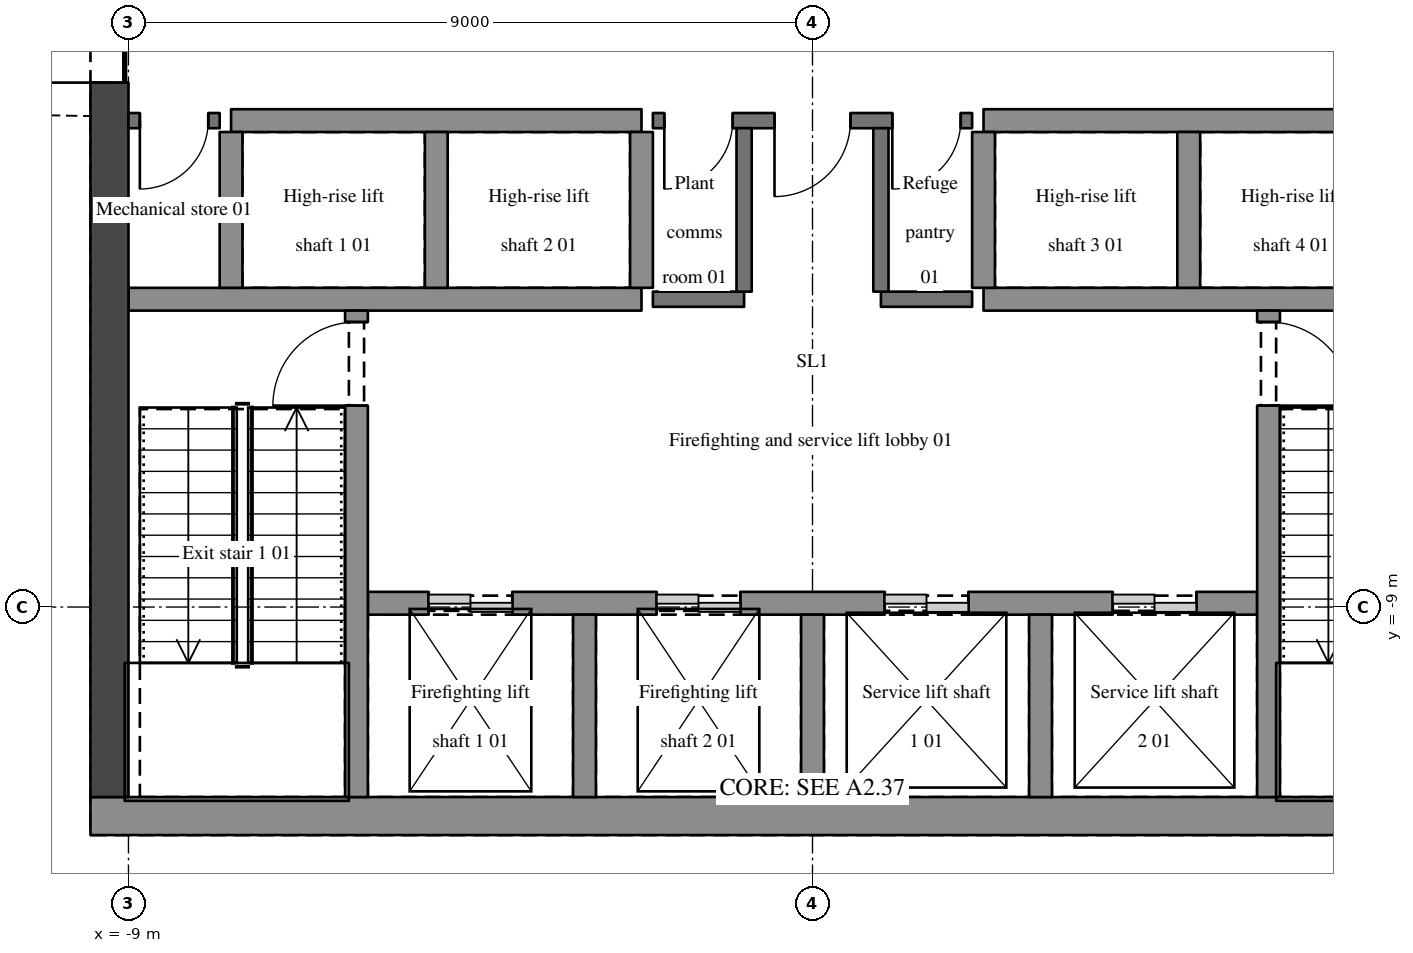
"""IFC4 building model, lengths in metres.
Left out: names, types, materials, properties, quantities, classifications, styles, units other than length and angle.
Written with IfcOpenShell. Run it as: python <this file> out.ifc"""

import sys

from ifc_helpers import new_model, si_unit, direction, frame, frame_2d, origin, place, context, subcontext, project, spatial, rectangle, extrude, element, fill, save


model = new_model("IFC4")
c1 = context("Model", 3, precision=1e-05, world=origin(), true_north=direction((0.0, 1.0)))
c2 = subcontext(c1, "Body", "Model", "MODEL_VIEW")
j1 = project(units=[si_unit("LENGTHUNIT", "METRE"), si_unit("PLANEANGLEUNIT", "RADIAN")], contexts=[c1])
p1 = place(None, origin())
s1 = spatial("IfcSite", under=j1, at=p1, CompositionType="ELEMENT")
p2 = place(p1, origin())
s2 = spatial("IfcBuilding", under=s1, at=p2, CompositionType="ELEMENT")
p3 = place(p2, frame((0.0, 0.0, 255.0)))
s3 = spatial("IfcBuildingStorey", under=s2, at=p3, CompositionType="ELEMENT", Elevation=255.0)
p4 = place(p3, frame((-9.5, -11.75, 0.0), z_axis=(0.0, 0.0, 1.0), x_axis=(1.0, 0.0, 0.0)))
e1 = element("IfcWall", 1, at=p4, inside=s3, PredefinedType="SHEAR", context=c2, shape_type="SweptSolid", body=[
    extrude(rectangle(XDim=19.0, YDim=0.5, at=frame_2d((9.5, 0.0))), origin(), (0.0, 0.0, 1.0), 4.5),
])
p5 = place(p3, frame((-9.25, -11.5, 0.0), z_axis=(0.0, 0.0, 1.0), x_axis=(0.0, 1.0, 0.0)))
e2 = element("IfcWall", 2, at=p5, inside=s3, PredefinedType="SHEAR", context=c2, shape_type="SweptSolid", body=[
    extrude(rectangle(XDim=11.65, YDim=0.5, at=frame_2d((5.825, 0.0))), origin(), (0.0, 0.0, 1.0), 4.5),
])
p6 = place(p5, frame((9.4, 0.0, 0.0)))
e3 = element("IfcOpeningElement", 3, at=p6, cuts=e2, PredefinedType="OPENING", context=c2, shape_type="SweptSolid", body=[
    extrude(rectangle(XDim=1.8, YDim=2.1, at=frame_2d((0.9, 1.05))), frame((0.0, 0.26, 0.0), z_axis=(0.0, -1.0, 0.0), x_axis=(1.0, 0.0, 0.0)), (0.0, 0.0, 1.0), 0.52),
])
p7 = place(p3, frame((-5.85, -8.95, 0.0), z_axis=(0.0, 0.0, 1.0), x_axis=(1.0, 0.0, 0.0)))
e4 = element("IfcWall", 4, at=p7, inside=s3, PredefinedType="SHEAR", context=c2, shape_type="SweptSolid", body=[
    extrude(rectangle(XDim=11.7, YDim=0.3, at=frame_2d((5.85, 0.0))), origin(), (0.0, 0.0, 1.0), 4.5),
])
p8 = place(p7, frame((0.8, 0.0, 0.0)))
e5 = element("IfcOpeningElement", 5, at=p8, cuts=e4, PredefinedType="OPENING", context=c2, shape_type="SweptSolid", body=[
    extrude(rectangle(XDim=1.1, YDim=2.1, at=frame_2d((0.55, 1.05))), frame((0.0, 0.16, 0.0), z_axis=(0.0, -1.0, 0.0), x_axis=(1.0, 0.0, 0.0)), (0.0, 0.0, 1.0), 0.32),
])
p9 = place(p7, frame((3.8, 0.0, 0.0)))
e6 = element("IfcOpeningElement", 6, at=p9, cuts=e4, PredefinedType="OPENING", context=c2, shape_type="SweptSolid", body=[
    extrude(rectangle(XDim=1.1, YDim=2.1, at=frame_2d((0.55, 1.05))), frame((0.0, 0.16, 0.0), z_axis=(0.0, -1.0, 0.0), x_axis=(1.0, 0.0, 0.0)), (0.0, 0.0, 1.0), 0.32),
])
p10 = place(p7, frame((6.8, 0.0, 0.0)))
e7 = element("IfcOpeningElement", 7, at=p10, cuts=e4, PredefinedType="OPENING", context=c2, shape_type="SweptSolid", body=[
    extrude(rectangle(XDim=1.1, YDim=2.1, at=frame_2d((0.55, 1.05))), frame((0.0, 0.16, 0.0), z_axis=(0.0, -1.0, 0.0), x_axis=(1.0, 0.0, 0.0)), (0.0, 0.0, 1.0), 0.32),
])
p11 = place(p7, frame((9.8, 0.0, 0.0)))
e8 = element("IfcOpeningElement", 8, at=p11, cuts=e4, PredefinedType="OPENING", context=c2, shape_type="SweptSolid", body=[
    extrude(rectangle(XDim=1.1, YDim=2.1, at=frame_2d((0.55, 1.05))), frame((0.0, 0.16, 0.0), z_axis=(0.0, -1.0, 0.0), x_axis=(1.0, 0.0, 0.0)), (0.0, 0.0, 1.0), 0.32),
])
p12 = place(p3, frame((-9.0, -4.95, 0.0), z_axis=(0.0, 0.0, 1.0), x_axis=(1.0, 0.0, 0.0)))
e9 = element("IfcWall", 9, at=p12, inside=s3, PredefinedType="SHEAR", context=c2, shape_type="SweptSolid", body=[
    extrude(rectangle(XDim=6.75, YDim=0.3, at=frame_2d((3.375, 0.0))), origin(), (0.0, 0.0, 1.0), 4.5),
])
for number, where, z_axis, x_axis in (
    (10, (-2.1, -4.95, 0.0), (0.0, 0.0, 1.0), (1.0, 0.0, 0.0)),
    (11, (0.9, -4.95, 0.0), (0.0, 0.0, 1.0), (1.0, 0.0, 0.0)),
):
    element("IfcWall", number, at=place(p3, frame(where, z_axis=z_axis, x_axis=x_axis)), inside=s3, PredefinedType="SOLIDWALL", context=c2, shape_type="SweptSolid", body=[
        extrude(rectangle(XDim=1.2, YDim=0.2, at=frame_2d((0.6, 0.0))), origin(), (0.0, 0.0, 1.0), 4.2),
    ])
p13 = place(p3, frame((2.25, -4.95, 0.0), z_axis=(0.0, 0.0, 1.0), x_axis=(1.0, 0.0, 0.0)))
e12 = element("IfcWall", 12, at=p13, inside=s3, PredefinedType="SHEAR", context=c2, shape_type="SweptSolid", body=[
    extrude(rectangle(XDim=6.75, YDim=0.3, at=frame_2d((3.375, 0.0))), origin(), (0.0, 0.0, 1.0), 4.5),
])
p14 = place(p3, frame((-7.8, -2.6, 0.0), z_axis=(0.0, 0.0, 1.0), x_axis=(-1.0, 0.0, 0.0)))
e13 = element("IfcWall", 13, at=p14, inside=s3, PredefinedType="SOLIDWALL", context=c2, shape_type="SweptSolid", body=[
    extrude(rectangle(XDim=1.2, YDim=0.2, at=frame_2d((0.6, 0.0))), origin(), (0.0, 0.0, 1.0), 4.2),
])
p15 = place(p14, frame((0.15, 0.0, 0.0)))
e14 = element("IfcOpeningElement", 14, at=p15, cuts=e13, PredefinedType="OPENING", context=c2, shape_type="SweptSolid", body=[
    extrude(rectangle(XDim=0.9, YDim=2.1, at=frame_2d((0.45, 1.05))), frame((0.0, 0.11, 0.0), z_axis=(0.0, -1.0, 0.0), x_axis=(1.0, 0.0, 0.0)), (0.0, 0.0, 1.0), 0.22),
])
p16 = place(p3, frame((-7.65, -2.6, 0.0), z_axis=(0.0, 0.0, 1.0), x_axis=(1.0, 0.0, 0.0)))
e15 = element("IfcWall", 15, at=p16, inside=s3, PredefinedType="SHEAR", context=c2, shape_type="SweptSolid", body=[
    extrude(rectangle(XDim=5.4, YDim=0.3, at=frame_2d((2.7, 0.0))), origin(), (0.0, 0.0, 1.0), 4.5),
])
p17 = place(p3, frame((2.1, -2.6, 0.0), z_axis=(0.0, 0.0, 1.0), x_axis=(-1.0, 0.0, 0.0)))
e16 = element("IfcWall", 16, at=p17, inside=s3, PredefinedType="SOLIDWALL", context=c2, shape_type="SweptSolid", body=[
    extrude(rectangle(XDim=4.2, YDim=0.2, at=frame_2d((2.1, 0.0))), origin(), (0.0, 0.0, 1.0), 4.2),
])
p18 = place(p17, frame((1.6, 0.0, 0.0)))
e17 = element("IfcOpeningElement", 17, at=p18, cuts=e16, PredefinedType="OPENING", context=c2, shape_type="SweptSolid", body=[
    extrude(rectangle(XDim=1.0, YDim=2.1, at=frame_2d((0.5, 1.05))), frame((0.0, 0.11, 0.0), z_axis=(0.0, -1.0, 0.0), x_axis=(1.0, 0.0, 0.0)), (0.0, 0.0, 1.0), 0.22),
])
p19 = place(p17, frame((3.15, 0.0, 0.0)))
e18 = element("IfcOpeningElement", 18, at=p19, cuts=e16, PredefinedType="OPENING", context=c2, shape_type="SweptSolid", body=[
    extrude(rectangle(XDim=0.9, YDim=2.1, at=frame_2d((0.45, 1.05))), frame((0.0, 0.11, 0.0), z_axis=(0.0, -1.0, 0.0), x_axis=(1.0, 0.0, 0.0)), (0.0, 0.0, 1.0), 0.22),
])
p20 = place(p17, frame((0.15, 0.0, 0.0)))
e19 = element("IfcOpeningElement", 19, at=p20, cuts=e16, PredefinedType="OPENING", context=c2, shape_type="SweptSolid", body=[
    extrude(rectangle(XDim=0.9, YDim=2.1, at=frame_2d((0.45, 1.05))), frame((0.0, 0.11, 0.0), z_axis=(0.0, -1.0, 0.0), x_axis=(1.0, 0.0, 0.0)), (0.0, 0.0, 1.0), 0.22),
])
p21 = place(p3, frame((2.25, -2.6, 0.0), z_axis=(0.0, 0.0, 1.0), x_axis=(1.0, 0.0, 0.0)))
e20 = element("IfcWall", 20, at=p21, inside=s3, PredefinedType="SHEAR", context=c2, shape_type="SweptSolid", body=[
    extrude(rectangle(XDim=5.4, YDim=0.3, at=frame_2d((2.7, 0.0))), origin(), (0.0, 0.0, 1.0), 4.5),
])
p22 = place(p3, frame((-7.65, -4.8, 0.0), z_axis=(0.0, 0.0, 1.0), x_axis=(0.0, 1.0, 0.0)))
e21 = element("IfcWall", 21, at=p22, inside=s3, PredefinedType="SHEAR", context=c2, shape_type="SweptSolid", body=[
    extrude(rectangle(XDim=2.05, YDim=0.3, at=frame_2d((1.025, 0.0))), origin(), (0.0, 0.0, 1.0), 4.5),
])
p23 = place(p3, frame((-6.0, -11.5, 0.0), z_axis=(0.0, 0.0, 1.0), x_axis=(0.0, 1.0, 0.0)))
e22 = element("IfcWall", 22, at=p23, inside=s3, PredefinedType="SHEAR", context=c2, shape_type="SweptSolid", body=[
    extrude(rectangle(XDim=6.4, YDim=0.3, at=frame_2d((3.2, 0.0))), origin(), (0.0, 0.0, 1.0), 4.5),
])
p24 = place(p23, frame((5.15, 0.0, 0.0)))
e23 = element("IfcOpeningElement", 23, at=p24, cuts=e22, PredefinedType="OPENING", context=c2, shape_type="SweptSolid", body=[
    extrude(rectangle(XDim=1.1, YDim=2.1, at=frame_2d((0.55, 1.05))), frame((0.0, 0.16, 0.0), z_axis=(0.0, -1.0, 0.0), x_axis=(1.0, 0.0, 0.0)), (0.0, 0.0, 1.0), 0.32),
])
p25 = place(p3, frame((-4.95, -4.8, 0.0), z_axis=(0.0, 0.0, 1.0), x_axis=(0.0, 1.0, 0.0)))
e24 = element("IfcWall", 24, at=p25, inside=s3, PredefinedType="SHEAR", context=c2, shape_type="SweptSolid", body=[
    extrude(rectangle(XDim=2.05, YDim=0.3, at=frame_2d((1.025, 0.0))), origin(), (0.0, 0.0, 1.0), 4.5),
])
p26 = place(p3, frame((-3.0, -11.5, 0.0), z_axis=(0.0, 0.0, 1.0), x_axis=(0.0, 1.0, 0.0)))
e25 = element("IfcWall", 25, at=p26, inside=s3, PredefinedType="SHEAR", context=c2, shape_type="SweptSolid", body=[
    extrude(rectangle(XDim=2.4, YDim=0.3, at=frame_2d((1.2, 0.0))), origin(), (0.0, 0.0, 1.0), 4.5),
])
p27 = place(p3, frame((-2.25, -4.8, 0.0), z_axis=(0.0, 0.0, 1.0), x_axis=(0.0, 1.0, 0.0)))
e26 = element("IfcWall", 26, at=p27, inside=s3, PredefinedType="SHEAR", context=c2, shape_type="SweptSolid", body=[
    extrude(rectangle(XDim=2.05, YDim=0.3, at=frame_2d((1.025, 0.0))), origin(), (0.0, 0.0, 1.0), 4.5),
])
p28 = place(p3, frame((-0.9, -4.85, 0.0), z_axis=(0.0, 0.0, 1.0), x_axis=(0.0, 1.0, 0.0)))
e27 = element("IfcWall", 27, at=p28, inside=s3, PredefinedType="SOLIDWALL", context=c2, shape_type="SweptSolid", body=[
    extrude(rectangle(XDim=2.15, YDim=0.2, at=frame_2d((1.075, 0.0))), origin(), (0.0, 0.0, 1.0), 4.2),
])
p29 = place(p3, frame((0.0, -11.5, 0.0), z_axis=(0.0, 0.0, 1.0), x_axis=(0.0, 1.0, 0.0)))
e28 = element("IfcWall", 28, at=p29, inside=s3, PredefinedType="SHEAR", context=c2, shape_type="SweptSolid", body=[
    extrude(rectangle(XDim=2.4, YDim=0.3, at=frame_2d((1.2, 0.0))), origin(), (0.0, 0.0, 1.0), 4.5),
])
p30 = place(p3, frame((0.9, -4.85, 0.0), z_axis=(0.0, 0.0, 1.0), x_axis=(0.0, 1.0, 0.0)))
e29 = element("IfcWall", 29, at=p30, inside=s3, PredefinedType="SOLIDWALL", context=c2, shape_type="SweptSolid", body=[
    extrude(rectangle(XDim=2.15, YDim=0.2, at=frame_2d((1.075, 0.0))), origin(), (0.0, 0.0, 1.0), 4.2),
])
p31 = place(p3, frame((2.25, -4.8, 0.0), z_axis=(0.0, 0.0, 1.0), x_axis=(0.0, 1.0, 0.0)))
e30 = element("IfcWall", 30, at=p31, inside=s3, PredefinedType="SHEAR", context=c2, shape_type="SweptSolid", body=[
    extrude(rectangle(XDim=2.05, YDim=0.3, at=frame_2d((1.025, 0.0))), origin(), (0.0, 0.0, 1.0), 4.5),
])
p32 = place(p3, frame((3.0, -11.5, 0.0), z_axis=(0.0, 0.0, 1.0), x_axis=(0.0, 1.0, 0.0)))
e31 = element("IfcWall", 31, at=p32, inside=s3, PredefinedType="SHEAR", context=c2, shape_type="SweptSolid", body=[
    extrude(rectangle(XDim=2.4, YDim=0.3, at=frame_2d((1.2, 0.0))), origin(), (0.0, 0.0, 1.0), 4.5),
])
p33 = place(p3, frame((4.95, -4.8, 0.0), z_axis=(0.0, 0.0, 1.0), x_axis=(0.0, 1.0, 0.0)))
e32 = element("IfcWall", 32, at=p33, inside=s3, PredefinedType="SHEAR", context=c2, shape_type="SweptSolid", body=[
    extrude(rectangle(XDim=2.05, YDim=0.3, at=frame_2d((1.025, 0.0))), origin(), (0.0, 0.0, 1.0), 4.5),
])
p34 = place(p3, frame((6.0, -5.1, 0.0), z_axis=(0.0, 0.0, 1.0), x_axis=(0.0, -1.0, 0.0)))
e33 = element("IfcWall", 33, at=p34, inside=s3, PredefinedType="SHEAR", context=c2, shape_type="SweptSolid", body=[
    extrude(rectangle(XDim=6.4, YDim=0.3, at=frame_2d((3.2, 0.0))), origin(), (0.0, 0.0, 1.0), 4.5),
])
p35 = place(p34, frame((0.15, 0.0, 0.0)))
e34 = element("IfcOpeningElement", 34, at=p35, cuts=e33, PredefinedType="OPENING", context=c2, shape_type="SweptSolid", body=[
    extrude(rectangle(XDim=1.1, YDim=2.1, at=frame_2d((0.55, 1.05))), frame((0.0, 0.16, 0.0), z_axis=(0.0, -1.0, 0.0), x_axis=(1.0, 0.0, 0.0)), (0.0, 0.0, 1.0), 0.32),
])
p36 = place(p6, origin())
e35 = element("IfcDoor", 35, at=p36, inside=s3, OperationType="DOUBLE_DOOR_SINGLE_SWING", PredefinedType="DOOR", context=c2, shape_type="SweptSolid", body=[
    extrude(rectangle(XDim=1.8, YDim=2.1, at=frame_2d((0.9, 1.05))), frame((0.0, 0.025, 0.0), z_axis=(0.0, -1.0, 0.0), x_axis=(1.0, 0.0, 0.0)), (0.0, 0.0, 1.0), 0.05),
])
fill(e3, e35)
p37 = place(p18, origin())
e36 = element("IfcDoor", 36, at=p37, inside=s3, OperationType="SINGLE_SWING_RIGHT", PredefinedType="DOOR", context=c2, shape_type="SweptSolid", body=[
    extrude(rectangle(XDim=1.0, YDim=2.1, at=frame_2d((0.5, 1.05))), frame((0.0, 0.025, 0.0), z_axis=(0.0, -1.0, 0.0), x_axis=(1.0, 0.0, 0.0)), (0.0, 0.0, 1.0), 0.05),
])
fill(e17, e36)
p38 = place(p24, origin())
e37 = element("IfcDoor", 37, at=p38, inside=s3, OperationType="SINGLE_SWING_LEFT", PredefinedType="DOOR", context=c2, shape_type="SweptSolid", body=[
    extrude(rectangle(XDim=1.1, YDim=2.1, at=frame_2d((0.55, 1.05))), frame((0.0, 0.025, 0.0), z_axis=(0.0, -1.0, 0.0), x_axis=(1.0, 0.0, 0.0)), (0.0, 0.0, 1.0), 0.05),
])
fill(e23, e37)
p39 = place(p35, origin())
e38 = element("IfcDoor", 38, at=p39, inside=s3, OperationType="SINGLE_SWING_RIGHT", PredefinedType="DOOR", context=c2, shape_type="SweptSolid", body=[
    extrude(rectangle(XDim=1.1, YDim=2.1, at=frame_2d((0.55, 1.05))), frame((0.0, 0.025, 0.0), z_axis=(0.0, -1.0, 0.0), x_axis=(1.0, 0.0, 0.0)), (0.0, 0.0, 1.0), 0.05),
])
fill(e34, e38)
p40 = place(p19, origin())
e39 = element("IfcDoor", 39, at=p40, inside=s3, OperationType="SINGLE_SWING_RIGHT", PredefinedType="DOOR", context=c2, shape_type="SweptSolid", body=[
    extrude(rectangle(XDim=0.9, YDim=2.1, at=frame_2d((0.45, 1.05))), frame((0.0, 0.025, 0.0), z_axis=(0.0, -1.0, 0.0), x_axis=(1.0, 0.0, 0.0)), (0.0, 0.0, 1.0), 0.05),
])
fill(e18, e39)
p41 = place(p20, origin())
e40 = element("IfcDoor", 40, at=p41, inside=s3, OperationType="SINGLE_SWING_RIGHT", PredefinedType="DOOR", context=c2, shape_type="SweptSolid", body=[
    extrude(rectangle(XDim=0.9, YDim=2.1, at=frame_2d((0.45, 1.05))), frame((0.0, 0.025, 0.0), z_axis=(0.0, -1.0, 0.0), x_axis=(1.0, 0.0, 0.0)), (0.0, 0.0, 1.0), 0.05),
])
fill(e19, e40)
p42 = place(p15, origin())
e41 = element("IfcDoor", 41, at=p42, inside=s3, OperationType="SINGLE_SWING_RIGHT", PredefinedType="DOOR", context=c2, shape_type="SweptSolid", body=[
    extrude(rectangle(XDim=0.9, YDim=2.1, at=frame_2d((0.45, 1.05))), frame((0.0, 0.025, 0.0), z_axis=(0.0, -1.0, 0.0), x_axis=(1.0, 0.0, 0.0)), (0.0, 0.0, 1.0), 0.05),
])
fill(e14, e41)
p43 = place(p8, origin())
e42 = element("IfcDoor", 42, at=p43, inside=s3, OperationType="DOUBLE_DOOR_SLIDING", PredefinedType="DOOR", context=c2, shape_type="SweptSolid", body=[
    extrude(rectangle(XDim=1.1, YDim=2.1, at=frame_2d((0.55, 1.05))), frame((0.0, 0.025, 0.0), z_axis=(0.0, -1.0, 0.0), x_axis=(1.0, 0.0, 0.0)), (0.0, 0.0, 1.0), 0.05),
])
fill(e5, e42)
p44 = place(p9, origin())
e43 = element("IfcDoor", 43, at=p44, inside=s3, OperationType="DOUBLE_DOOR_SLIDING", PredefinedType="DOOR", context=c2, shape_type="SweptSolid", body=[
    extrude(rectangle(XDim=1.1, YDim=2.1, at=frame_2d((0.55, 1.05))), frame((0.0, 0.025, 0.0), z_axis=(0.0, -1.0, 0.0), x_axis=(1.0, 0.0, 0.0)), (0.0, 0.0, 1.0), 0.05),
])
fill(e6, e43)
p45 = place(p10, origin())
e44 = element("IfcDoor", 44, at=p45, inside=s3, OperationType="DOUBLE_DOOR_SLIDING", PredefinedType="DOOR", context=c2, shape_type="SweptSolid", body=[
    extrude(rectangle(XDim=1.1, YDim=2.1, at=frame_2d((0.55, 1.05))), frame((0.0, 0.025, 0.0), z_axis=(0.0, -1.0, 0.0), x_axis=(1.0, 0.0, 0.0)), (0.0, 0.0, 1.0), 0.05),
])
fill(e7, e44)
p46 = place(p11, origin())
e45 = element("IfcDoor", 45, at=p46, inside=s3, OperationType="DOUBLE_DOOR_SLIDING", PredefinedType="DOOR", context=c2, shape_type="SweptSolid", body=[
    extrude(rectangle(XDim=1.1, YDim=2.1, at=frame_2d((0.55, 1.05))), frame((0.0, 0.025, 0.0), z_axis=(0.0, -1.0, 0.0), x_axis=(1.0, 0.0, 0.0)), (0.0, 0.0, 1.0), 0.05),
])
fill(e8, e45)
save(model, sys.argv[1])
